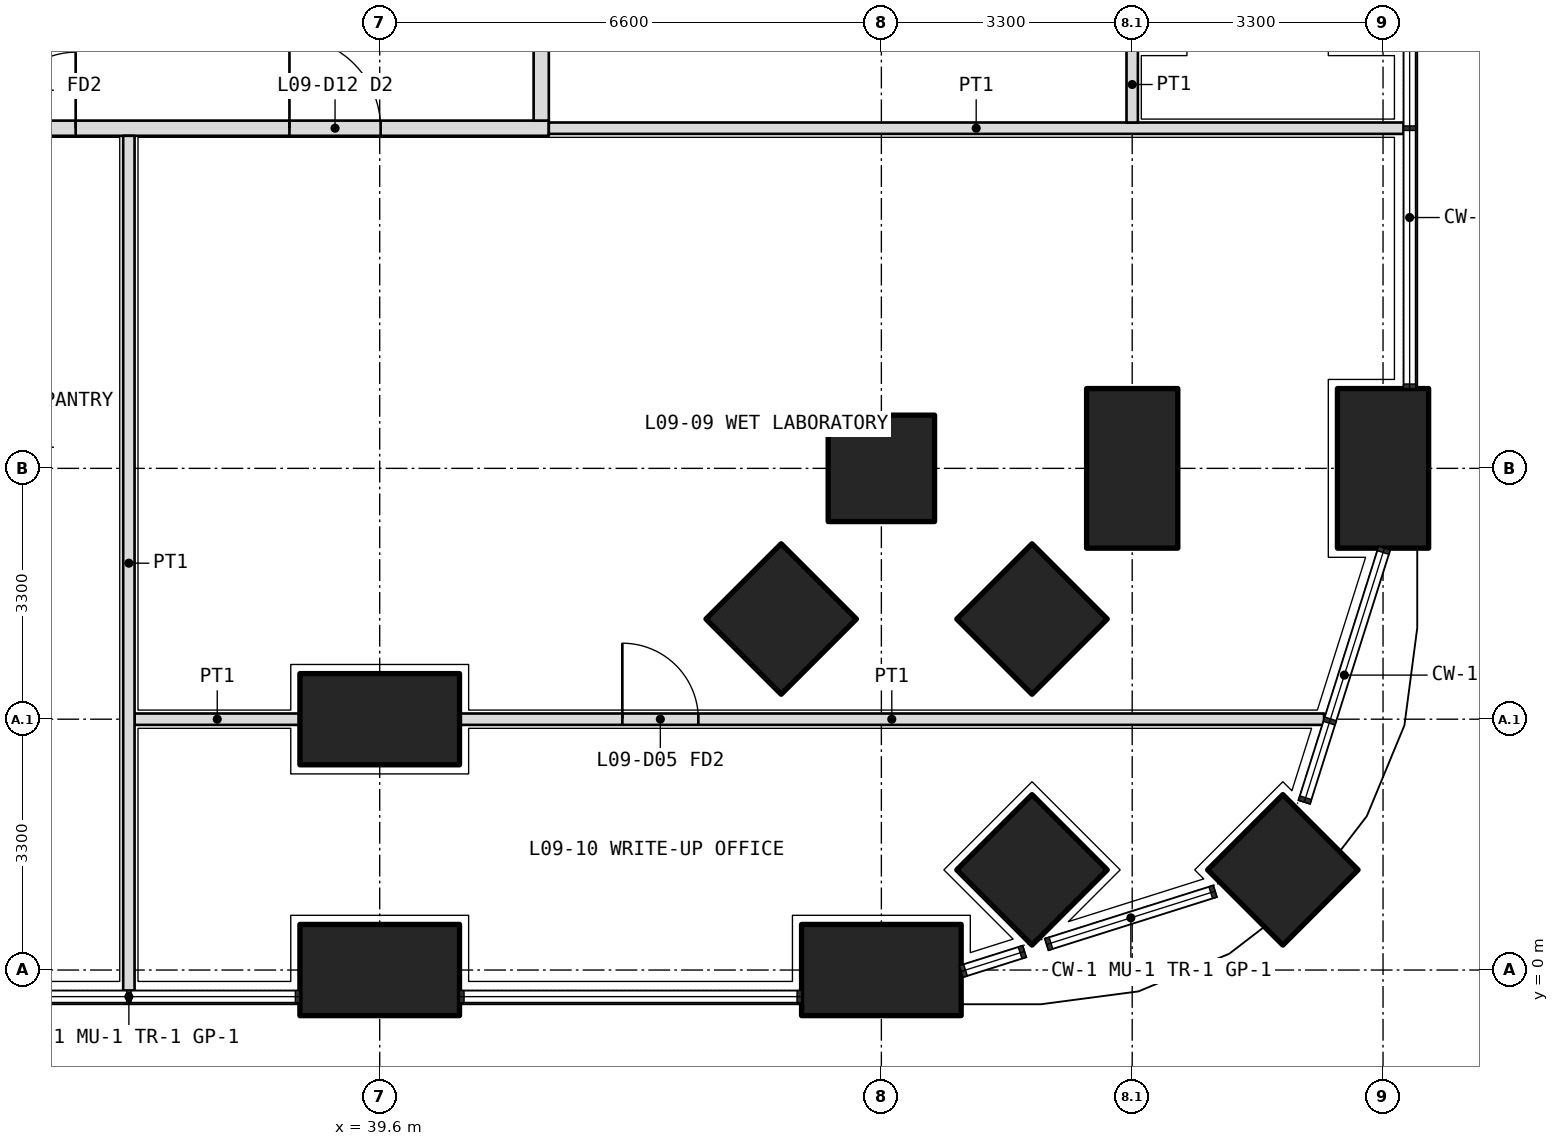
"""IFC4 building model, lengths in metres.
Left out: names, types, materials, properties, quantities, classifications, styles, units other than length and angle.
Written with IfcOpenShell. Run it as: python <this file> out.ifc"""

import sys

from ifc_helpers import new_model, si_unit, direction, frame, frame_2d, origin, origin_2d, place, context, subcontext, project, spatial, rectangle, extrude, element, fill, save


model = new_model("IFC4")
c1 = context("Model", 3, precision=1e-05, world=origin(), true_north=direction((0.0, 1.0)))
c2 = subcontext(c1, "Body", "Model", "MODEL_VIEW")
j1 = project(units=[si_unit("LENGTHUNIT", "METRE"), si_unit("PLANEANGLEUNIT", "RADIAN")], contexts=[c1])
p1 = place(None, origin())
s1 = spatial("IfcSite", under=j1, at=p1, CompositionType="ELEMENT")
p2 = place(p1, origin())
s2 = spatial("IfcBuilding", under=s1, at=p2, CompositionType="ELEMENT")
p3 = place(p2, frame((0.0, 0.0, 42.3)))
s3 = spatial("IfcBuildingStorey", under=s2, at=p3, CompositionType="ELEMENT", Elevation=42.3)
p4 = place(p3, frame((51.482, 1.318, 0.0), z_axis=(0.0, 0.0, 1.0), x_axis=(0.707106781187, 0.707106781187, 0.0)))
e1 = element("IfcColumn", 1, at=p4, inside=s3, PredefinedType="COLUMN", context=c2, shape_type="SweptSolid", body=[
    extrude(rectangle(XDim=1.4, YDim=1.4, at=origin_2d()), origin(), (0.0, 0.0, 1.0), 4.2),
])
for number, where, z_axis, x_axis in (
    (2, (39.6, 0.0, 0.0), (0.0, 0.0, 1.0), (1.0, 0.0, 0.0)),
    (3, (46.2, 0.0, 0.0), (0.0, 0.0, 1.0), (1.0, 0.0, 0.0)),
    (4, (52.8, 6.6, 0.0), (0.0, 0.0, 1.0), (0.0, 1.0, 0.0)),
):
    element("IfcColumn", number, at=place(p3, frame(where, z_axis=z_axis, x_axis=x_axis)), inside=s3, PredefinedType="COLUMN", context=c2, shape_type="SweptSolid", body=[
        extrude(rectangle(XDim=2.1, YDim=1.2, at=origin_2d()), origin(), (0.0, 0.0, 1.0), 4.2),
    ])
for number, where, z_axis, x_axis in (
    (5, (46.2, 6.6, 0.0), (0.0, 0.0, 1.0), (1.0, 0.0, 0.0)),
    (6, (48.182, 1.318, 0.0), (0.0, 0.0, 1.0), (0.707, 0.707, 0.0)),
):
    element("IfcColumn", number, at=place(p3, frame(where, z_axis=z_axis, x_axis=x_axis)), inside=s3, PredefinedType="COLUMN", context=c2, shape_type="SweptSolid", body=[
        extrude(rectangle(XDim=1.4, YDim=1.4, at=origin_2d()), origin(), (0.0, 0.0, 1.0), 4.2),
    ])
p5 = place(p3, frame((49.5, 6.6, 0.0), z_axis=(0.0, 0.0, 1.0), x_axis=(0.0, 1.0, 0.0)))
e7 = element("IfcColumn", 7, at=p5, inside=s3, PredefinedType="COLUMN", context=c2, shape_type="SweptSolid", body=[
    extrude(rectangle(XDim=2.1, YDim=1.2, at=origin_2d()), origin(), (0.0, 0.0, 1.0), 4.2),
])
p6 = place(p3, frame((48.182, 4.618, 0.0), z_axis=(0.0, 0.0, 1.0), x_axis=(0.707106781187, 0.707106781187, 0.0)))
e8 = element("IfcColumn", 8, at=p6, inside=s3, PredefinedType="COLUMN", context=c2, shape_type="SweptSolid", body=[
    extrude(rectangle(XDim=1.4, YDim=1.4, at=origin_2d()), origin(), (0.0, 0.0, 1.0), 4.2),
])
p7 = place(p3, frame((39.6, 3.3, 0.0), z_axis=(0.0, 0.0, 1.0), x_axis=(1.0, 0.0, 0.0)))
e9 = element("IfcColumn", 9, at=p7, inside=s3, PredefinedType="COLUMN", context=c2, shape_type="SweptSolid", body=[
    extrude(rectangle(XDim=2.1, YDim=1.2, at=origin_2d()), origin(), (0.0, 0.0, 1.0), 4.2),
])
p8 = place(p3, frame((44.882, 4.618, 0.0), z_axis=(0.0, 0.0, 1.0), x_axis=(0.707106781187, 0.707106781187, 0.0)))
e10 = element("IfcColumn", 10, at=p8, inside=s3, PredefinedType="COLUMN", context=c2, shape_type="SweptSolid", body=[
    extrude(rectangle(XDim=1.4, YDim=1.4, at=origin_2d()), origin(), (0.0, 0.0, 1.0), 4.2),
])
p9 = place(p3, frame((10.975, 11.075, 0.0), z_axis=(0.0, 0.0, 1.0), x_axis=(1.0, 0.0, 0.0)))
e11 = element("IfcWall", 11, at=p9, inside=s3, PredefinedType="PARTITIONING", context=c2, shape_type="SweptSolid", body=[
    extrude(rectangle(XDim=30.85, YDim=0.2, at=frame_2d((15.425, 0.0))), origin(), (0.0, 0.0, 1.0), 2.85),
])
p10 = place(p9, frame((2.312, 0.0, 0.0)))
e12 = element("IfcOpeningElement", 12, at=p10, cuts=e11, PredefinedType="OPENING", context=c2, shape_type="SweptSolid", body=[
    extrude(rectangle(XDim=1.0, YDim=2.1, at=frame_2d((0.5, 1.05))), frame((0.0, 0.11, 0.0), z_axis=(0.0, -1.0, 0.0), x_axis=(1.0, 0.0, 0.0)), (0.0, 0.0, 1.0), 0.22),
])
p11 = place(p9, frame((6.575, 0.0, 0.0)))
e13 = element("IfcOpeningElement", 13, at=p11, cuts=e11, PredefinedType="OPENING", context=c2, shape_type="SweptSolid", body=[
    extrude(rectangle(XDim=1.2, YDim=2.1, at=frame_2d((0.6, 1.05))), frame((0.0, 0.11, 0.0), z_axis=(0.0, -1.0, 0.0), x_axis=(1.0, 0.0, 0.0)), (0.0, 0.0, 1.0), 0.22),
])
p12 = place(p9, frame((13.275, 0.0, 0.0)))
e14 = element("IfcOpeningElement", 14, at=p12, cuts=e11, PredefinedType="OPENING", context=c2, shape_type="SweptSolid", body=[
    extrude(rectangle(XDim=1.0, YDim=2.1, at=frame_2d((0.5, 1.05))), frame((0.0, 0.11, 0.0), z_axis=(0.0, -1.0, 0.0), x_axis=(1.0, 0.0, 0.0)), (0.0, 0.0, 1.0), 0.22),
])
p13 = place(p9, frame((20.325, 0.0, 0.0)))
e15 = element("IfcOpeningElement", 15, at=p13, cuts=e11, PredefinedType="OPENING", context=c2, shape_type="SweptSolid", body=[
    extrude(rectangle(XDim=1.0, YDim=2.1, at=frame_2d((0.5, 1.05))), frame((0.0, 0.11, 0.0), z_axis=(0.0, -1.0, 0.0), x_axis=(1.0, 0.0, 0.0)), (0.0, 0.0, 1.0), 0.22),
])
p14 = place(p9, frame((23.625, 0.0, 0.0)))
e16 = element("IfcOpeningElement", 16, at=p14, cuts=e11, PredefinedType="OPENING", context=c2, shape_type="SweptSolid", body=[
    extrude(rectangle(XDim=1.0, YDim=2.1, at=frame_2d((0.5, 1.05))), frame((0.0, 0.11, 0.0), z_axis=(0.0, -1.0, 0.0), x_axis=(1.0, 0.0, 0.0)), (0.0, 0.0, 1.0), 0.22),
])
p15 = place(p9, frame((27.438, 0.0, 0.0)))
e17 = element("IfcOpeningElement", 17, at=p15, cuts=e11, PredefinedType="OPENING", context=c2, shape_type="SweptSolid", body=[
    extrude(rectangle(XDim=1.2, YDim=2.1, at=frame_2d((0.6, 1.05))), frame((0.0, 0.11, 0.0), z_axis=(0.0, -1.0, 0.0), x_axis=(1.0, 0.0, 0.0)), (0.0, 0.0, 1.0), 0.22),
])
p16 = place(p3, frame((41.725, 11.175, 0.0), z_axis=(0.0, 0.0, 1.0), x_axis=(0.0, 1.0, 0.0)))
e18 = element("IfcWall", 18, at=p16, inside=s3, PredefinedType="PARTITIONING", context=c2, shape_type="SweptSolid", body=[
    extrude(rectangle(XDim=23.85, YDim=0.2, at=frame_2d((11.925, 0.0))), origin(), (0.0, 0.0, 1.0), 2.85),
])
p17 = place(p16, frame((3.762, 0.0, 0.0)))
e19 = element("IfcOpeningElement", 19, at=p17, cuts=e18, PredefinedType="OPENING", context=c2, shape_type="SweptSolid", body=[
    extrude(rectangle(XDim=1.0, YDim=2.1, at=frame_2d((0.5, 1.05))), frame((0.0, 0.11, 0.0), z_axis=(0.0, -1.0, 0.0), x_axis=(1.0, 0.0, 0.0)), (0.0, 0.0, 1.0), 0.22),
])
p18 = place(p16, frame((9.725, 0.0, 0.0)))
e20 = element("IfcOpeningElement", 20, at=p18, cuts=e18, PredefinedType="OPENING", context=c2, shape_type="SweptSolid", body=[
    extrude(rectangle(XDim=1.0, YDim=2.1, at=frame_2d((0.5, 1.05))), frame((0.0, 0.11, 0.0), z_axis=(0.0, -1.0, 0.0), x_axis=(1.0, 0.0, 0.0)), (0.0, 0.0, 1.0), 0.22),
])
p19 = place(p16, frame((13.075, 0.0, 0.0)))
e21 = element("IfcOpeningElement", 21, at=p19, cuts=e18, PredefinedType="OPENING", context=c2, shape_type="SweptSolid", body=[
    extrude(rectangle(XDim=0.9, YDim=2.1, at=frame_2d((0.45, 1.05))), frame((0.0, 0.11, 0.0), z_axis=(0.0, -1.0, 0.0), x_axis=(1.0, 0.0, 0.0)), (0.0, 0.0, 1.0), 0.22),
])
p20 = place(p16, frame((17.925, 0.0, 0.0)))
e22 = element("IfcOpeningElement", 22, at=p20, cuts=e18, PredefinedType="OPENING", context=c2, shape_type="SweptSolid", body=[
    extrude(rectangle(XDim=1.2, YDim=2.1, at=frame_2d((0.6, 1.05))), frame((0.0, 0.11, 0.0), z_axis=(0.0, -1.0, 0.0), x_axis=(1.0, 0.0, 0.0)), (0.0, 0.0, 1.0), 0.22),
])
p21 = place(p16, frame((22.387, 0.0, 0.0)))
e23 = element("IfcOpeningElement", 23, at=p21, cuts=e18, PredefinedType="OPENING", context=c2, shape_type="SweptSolid", body=[
    extrude(rectangle(XDim=1.0, YDim=2.1, at=frame_2d((0.5, 1.05))), frame((0.0, 0.11, 0.0), z_axis=(0.0, -1.0, 0.0), x_axis=(1.0, 0.0, 0.0)), (0.0, 0.0, 1.0), 0.22),
])
p22 = place(p3, frame((53.07, 11.075, 0.0), z_axis=(0.0, 0.0, 1.0), x_axis=(-1.0, 0.0, 0.0)))
e24 = element("IfcWall", 24, at=p22, inside=s3, PredefinedType="PARTITIONING", context=c2, shape_type="SweptSolid", body=[
    extrude(rectangle(XDim=11.245, YDim=0.15, at=frame_2d((5.623, 0.0))), origin(), (0.0, 0.0, 1.0), 2.7),
])
p23 = place(p3, frame((36.375, 3.3, 0.0), z_axis=(0.0, 0.0, 1.0), x_axis=(1.0, 0.0, 0.0)))
e25 = element("IfcWall", 25, at=p23, inside=s3, PredefinedType="PARTITIONING", context=c2, shape_type="SweptSolid", body=[
    extrude(rectangle(XDim=2.175, YDim=0.15, at=frame_2d((1.087, 0.0))), origin(), (0.0, 0.0, 1.0), 3.9),
])
p24 = place(p3, frame((40.65, 3.3, 0.0), z_axis=(0.0, 0.0, 1.0), x_axis=(1.0, 0.0, 0.0)))
e26 = element("IfcWall", 26, at=p24, inside=s3, PredefinedType="PARTITIONING", context=c2, shape_type="SweptSolid", body=[
    extrude(rectangle(XDim=11.374, YDim=0.15, at=frame_2d((5.687, 0.0))), origin(), (0.0, 0.0, 1.0), 2.7),
])
p25 = place(p24, frame((2.142, 0.0, 0.0)))
e27 = element("IfcOpeningElement", 27, at=p25, cuts=e26, PredefinedType="OPENING", context=c2, shape_type="SweptSolid", body=[
    extrude(rectangle(XDim=1.0, YDim=2.1, at=frame_2d((0.5, 1.05))), frame((0.0, 0.085, 0.0), z_axis=(0.0, -1.0, 0.0), x_axis=(1.0, 0.0, 0.0)), (0.0, 0.0, 1.0), 0.17),
])
p26 = place(p3, frame((36.3, -0.27, 0.0), z_axis=(0.0, 0.0, 1.0), x_axis=(0.0, 1.0, 0.0)))
e28 = element("IfcWall", 28, at=p26, inside=s3, PredefinedType="PARTITIONING", context=c2, shape_type="SweptSolid", body=[
    extrude(rectangle(XDim=11.245, YDim=0.15, at=frame_2d((5.623, 0.0))), origin(), (0.0, 0.0, 1.0), 2.7),
])
p27 = place(p3, frame((49.5, 11.15, 0.0), z_axis=(0.0, 0.0, 1.0), x_axis=(0.0, 1.0, 0.0)))
e29 = element("IfcWall", 29, at=p27, inside=s3, PredefinedType="PARTITIONING", context=c2, shape_type="SweptSolid", body=[
    extrude(rectangle(XDim=1.0, YDim=0.15, at=frame_2d((0.5, 0.0))), origin(), (0.0, 0.0, 1.0), 3.9),
])
p28 = place(p14, origin())
e30 = element("IfcDoor", 30, at=p28, inside=s3, OperationType="SINGLE_SWING_RIGHT", PredefinedType="DOOR", context=c2, shape_type="SweptSolid", body=[
    extrude(rectangle(XDim=1.0, YDim=2.1, at=frame_2d((0.5, 1.05))), frame((0.0, 0.025, 0.0), z_axis=(0.0, -1.0, 0.0), x_axis=(1.0, 0.0, 0.0)), (0.0, 0.0, 1.0), 0.05),
])
fill(e16, e30)
p29 = place(p15, origin())
e31 = element("IfcDoor", 31, at=p29, inside=s3, OperationType="DOUBLE_DOOR_SINGLE_SWING", PredefinedType="DOOR", context=c2, shape_type="SweptSolid", body=[
    extrude(rectangle(XDim=1.2, YDim=2.1, at=frame_2d((0.6, 1.05))), frame((0.0, 0.025, 0.0), z_axis=(0.0, -1.0, 0.0), x_axis=(1.0, 0.0, 0.0)), (0.0, 0.0, 1.0), 0.05),
])
fill(e17, e31)
p30 = place(p25, origin())
e32 = element("IfcDoor", 32, at=p30, inside=s3, OperationType="SINGLE_SWING_LEFT", PredefinedType="DOOR", context=c2, shape_type="SweptSolid", body=[
    extrude(rectangle(XDim=1.0, YDim=2.1, at=frame_2d((0.5, 1.05))), frame((0.0, 0.025, 0.0), z_axis=(0.0, -1.0, 0.0), x_axis=(1.0, 0.0, 0.0)), (0.0, 0.0, 1.0), 0.05),
])
fill(e27, e32)
save(model, sys.argv[1])
